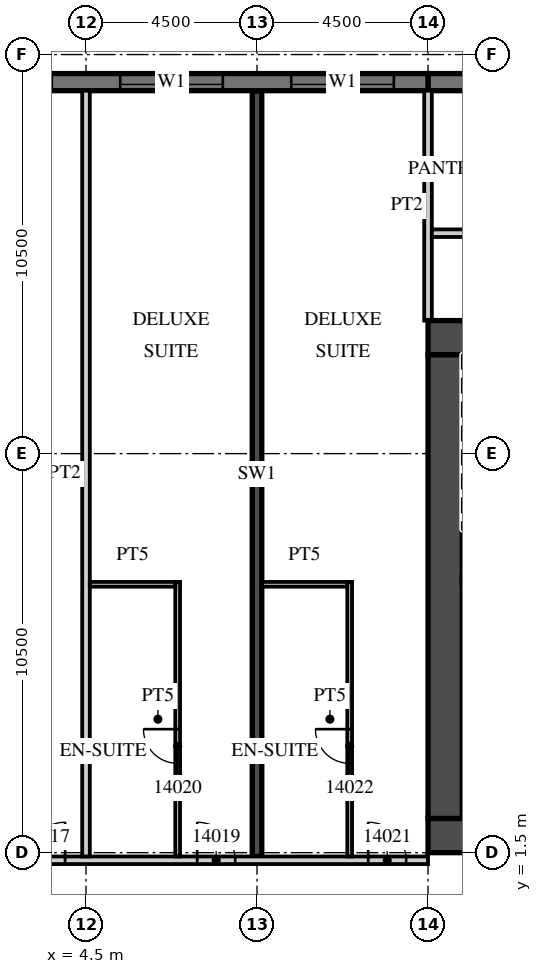
"""IFC4 building model, lengths in metres.
Left out: names, types, materials, properties, quantities, classifications, styles, units other than length and angle.
Written with IfcOpenShell. Run it as: python <this file> out.ifc"""

import sys

from ifc_helpers import new_model, si_unit, direction, frame, frame_2d, origin, place, context, subcontext, project, spatial, rectangle, extrude, element, fill, save


model = new_model("IFC4")
c1 = context("Model", 3, precision=1e-05, world=origin(), true_north=direction((0.0, 1.0)))
c2 = subcontext(c1, "Body", "Model", "MODEL_VIEW")
j1 = project(units=[si_unit("LENGTHUNIT", "METRE"), si_unit("PLANEANGLEUNIT", "RADIAN")], contexts=[c1])
p1 = place(None, origin())
s1 = spatial("IfcSite", under=j1, at=p1, CompositionType="ELEMENT")
p2 = place(p1, origin())
s2 = spatial("IfcBuilding", under=s1, at=p2, CompositionType="ELEMENT")
p3 = place(p2, frame((0.0, 0.0, 76.5)))
s3 = spatial("IfcBuildingStorey", under=s2, at=p3, CompositionType="ELEMENT", Elevation=76.5)
p4 = place(p3, frame((9.0, 1.4, 0.0), z_axis=(0.0, 0.0, 1.0), x_axis=(0.0, 1.0, 0.0)))
e1 = element("IfcWall", 1, at=p4, inside=s3, PredefinedType="SHEAR", context=c2, shape_type="SweptSolid", body=[
    extrude(rectangle(XDim=20.14, YDim=0.25, at=frame_2d((10.07, 0.0))), origin(), (0.0, 0.0, 1.0), 3.3),
])
p5 = place(p3, frame((31.5, 21.775, 0.0), z_axis=(0.0, 0.0, 1.0), x_axis=(-1.0, 0.0, 0.0)))
e2 = element("IfcWall", 2, at=p5, inside=s3, PredefinedType="SOLIDWALL", context=c2, shape_type="SweptSolid", body=[
    extrude(rectangle(XDim=18.0, YDim=0.45, at=frame_2d((9.0, 0.0))), origin(), (0.0, 0.0, 1.0), 3.02),
])
p6 = place(p3, frame((13.5, 21.775, 0.0), z_axis=(0.0, 0.0, 1.0), x_axis=(-1.0, 0.0, 0.0)))
e3 = element("IfcWall", 3, at=p6, inside=s3, PredefinedType="SOLIDWALL", context=c2, shape_type="SweptSolid", body=[
    extrude(rectangle(XDim=54.5, YDim=0.45, at=frame_2d((27.25, 0.0))), origin(), (0.0, 0.0, 1.0), 3.02),
])
p7 = place(p6, frame((0.9, 0.0, 0.45)))
e4 = element("IfcOpeningElement", 4, at=p7, cuts=e3, PredefinedType="OPENING", context=c2, shape_type="SweptSolid", body=[
    extrude(rectangle(XDim=2.7, YDim=2.25, at=frame_2d((1.35, 1.125))), frame((0.0, 0.235, 0.0), z_axis=(0.0, -1.0, 0.0), x_axis=(1.0, 0.0, 0.0)), (0.0, 0.0, 1.0), 0.47),
])
p8 = place(p6, frame((5.4, 0.0, 0.45)))
e5 = element("IfcOpeningElement", 5, at=p8, cuts=e3, PredefinedType="OPENING", context=c2, shape_type="SweptSolid", body=[
    extrude(rectangle(XDim=2.7, YDim=2.25, at=frame_2d((1.35, 1.125))), frame((0.0, 0.235, 0.0), z_axis=(0.0, -1.0, 0.0), x_axis=(1.0, 0.0, 0.0)), (0.0, 0.0, 1.0), 0.47),
])
p9 = place(p6, frame((9.9, 0.0, 0.45)))
e6 = element("IfcOpeningElement", 6, at=p9, cuts=e3, PredefinedType="OPENING", context=c2, shape_type="SweptSolid", body=[
    extrude(rectangle(XDim=2.7, YDim=2.25, at=frame_2d((1.35, 1.125))), frame((0.0, 0.235, 0.0), z_axis=(0.0, -1.0, 0.0), x_axis=(1.0, 0.0, 0.0)), (0.0, 0.0, 1.0), 0.47),
])
p10 = place(p6, frame((14.4, 0.0, 0.45)))
e7 = element("IfcOpeningElement", 7, at=p10, cuts=e3, PredefinedType="OPENING", context=c2, shape_type="SweptSolid", body=[
    extrude(rectangle(XDim=2.7, YDim=2.25, at=frame_2d((1.35, 1.125))), frame((0.0, 0.235, 0.0), z_axis=(0.0, -1.0, 0.0), x_axis=(1.0, 0.0, 0.0)), (0.0, 0.0, 1.0), 0.47),
])
p11 = place(p6, frame((18.9, 0.0, 0.45)))
e8 = element("IfcOpeningElement", 8, at=p11, cuts=e3, PredefinedType="OPENING", context=c2, shape_type="SweptSolid", body=[
    extrude(rectangle(XDim=2.7, YDim=2.25, at=frame_2d((1.35, 1.125))), frame((0.0, 0.235, 0.0), z_axis=(0.0, -1.0, 0.0), x_axis=(1.0, 0.0, 0.0)), (0.0, 0.0, 1.0), 0.47),
])
p12 = place(p6, frame((23.4, 0.0, 0.45)))
e9 = element("IfcOpeningElement", 9, at=p12, cuts=e3, PredefinedType="OPENING", context=c2, shape_type="SweptSolid", body=[
    extrude(rectangle(XDim=2.7, YDim=2.25, at=frame_2d((1.35, 1.125))), frame((0.0, 0.235, 0.0), z_axis=(0.0, -1.0, 0.0), x_axis=(1.0, 0.0, 0.0)), (0.0, 0.0, 1.0), 0.47),
])
p13 = place(p6, frame((27.9, 0.0, 0.45)))
e10 = element("IfcOpeningElement", 10, at=p13, cuts=e3, PredefinedType="OPENING", context=c2, shape_type="SweptSolid", body=[
    extrude(rectangle(XDim=2.7, YDim=2.25, at=frame_2d((1.35, 1.125))), frame((0.0, 0.235, 0.0), z_axis=(0.0, -1.0, 0.0), x_axis=(1.0, 0.0, 0.0)), (0.0, 0.0, 1.0), 0.47),
])
p14 = place(p6, frame((32.4, 0.0, 0.45)))
e11 = element("IfcOpeningElement", 11, at=p14, cuts=e3, PredefinedType="OPENING", context=c2, shape_type="SweptSolid", body=[
    extrude(rectangle(XDim=2.7, YDim=2.25, at=frame_2d((1.35, 1.125))), frame((0.0, 0.235, 0.0), z_axis=(0.0, -1.0, 0.0), x_axis=(1.0, 0.0, 0.0)), (0.0, 0.0, 1.0), 0.47),
])
p15 = place(p6, frame((36.9, 0.0, 0.45)))
e12 = element("IfcOpeningElement", 12, at=p15, cuts=e3, PredefinedType="OPENING", context=c2, shape_type="SweptSolid", body=[
    extrude(rectangle(XDim=2.7, YDim=2.25, at=frame_2d((1.35, 1.125))), frame((0.0, 0.235, 0.0), z_axis=(0.0, -1.0, 0.0), x_axis=(1.0, 0.0, 0.0)), (0.0, 0.0, 1.0), 0.47),
])
p16 = place(p6, frame((41.4, 0.0, 0.45)))
e13 = element("IfcOpeningElement", 13, at=p16, cuts=e3, PredefinedType="OPENING", context=c2, shape_type="SweptSolid", body=[
    extrude(rectangle(XDim=2.7, YDim=2.25, at=frame_2d((1.35, 1.125))), frame((0.0, 0.235, 0.0), z_axis=(0.0, -1.0, 0.0), x_axis=(1.0, 0.0, 0.0)), (0.0, 0.0, 1.0), 0.47),
])
p17 = place(p6, frame((45.9, 0.0, 0.45)))
e14 = element("IfcOpeningElement", 14, at=p17, cuts=e3, PredefinedType="OPENING", context=c2, shape_type="SweptSolid", body=[
    extrude(rectangle(XDim=2.7, YDim=2.25, at=frame_2d((1.35, 1.125))), frame((0.0, 0.235, 0.0), z_axis=(0.0, -1.0, 0.0), x_axis=(1.0, 0.0, 0.0)), (0.0, 0.0, 1.0), 0.47),
])
p18 = place(p6, frame((50.4, 0.0, 0.45)))
e15 = element("IfcOpeningElement", 15, at=p18, cuts=e3, PredefinedType="OPENING", context=c2, shape_type="SweptSolid", body=[
    extrude(rectangle(XDim=2.7, YDim=2.25, at=frame_2d((1.35, 1.125))), frame((0.0, 0.235, 0.0), z_axis=(0.0, -1.0, 0.0), x_axis=(1.0, 0.0, 0.0)), (0.0, 0.0, 1.0), 0.47),
])
p19 = place(p3, frame((13.5, 15.5, 0.0), z_axis=(0.0, 0.0, 1.0), x_axis=(0.0, 1.0, 0.0)))
e16 = element("IfcWall", 16, at=p19, inside=s3, PredefinedType="PARTITIONING", context=c2, shape_type="SweptSolid", body=[
    extrude(rectangle(XDim=6.05, YDim=0.2, at=frame_2d((3.025, 0.0))), origin(), (0.0, 0.0, 1.0), 3.02),
])
p20 = place(p3, frame((-44.55, 1.3, 0.0), z_axis=(0.0, 0.0, 1.0), x_axis=(1.0, 0.0, 0.0)))
e17 = element("IfcWall", 17, at=p20, inside=s3, PredefinedType="PARTITIONING", context=c2, shape_type="SweptSolid", body=[
    extrude(rectangle(XDim=58.05, YDim=0.2, at=frame_2d((29.025, 0.0))), origin(), (0.0, 0.0, 1.0), 3.02),
])
p21 = place(p20, frame((0.525, 0.0, 0.0)))
e18 = element("IfcOpeningElement", 18, at=p21, cuts=e17, PredefinedType="OPENING", context=c2, shape_type="SweptSolid", body=[
    extrude(rectangle(XDim=1.0, YDim=2.1, at=frame_2d((0.5, 1.05))), frame((0.0, 0.11, 0.0), z_axis=(0.0, -1.0, 0.0), x_axis=(1.0, 0.0, 0.0)), (0.0, 0.0, 1.0), 0.22),
])
p22 = place(p20, frame((6.975, 0.0, 0.0)))
e19 = element("IfcOpeningElement", 19, at=p22, cuts=e17, PredefinedType="OPENING", context=c2, shape_type="SweptSolid", body=[
    extrude(rectangle(XDim=1.0, YDim=2.1, at=frame_2d((0.5, 1.05))), frame((0.0, 0.11, 0.0), z_axis=(0.0, -1.0, 0.0), x_axis=(1.0, 0.0, 0.0)), (0.0, 0.0, 1.0), 0.22),
])
p23 = place(p20, frame((9.125, 0.0, 0.0)))
e20 = element("IfcOpeningElement", 20, at=p23, cuts=e17, PredefinedType="OPENING", context=c2, shape_type="SweptSolid", body=[
    extrude(rectangle(XDim=1.0, YDim=2.1, at=frame_2d((0.5, 1.05))), frame((0.0, 0.11, 0.0), z_axis=(0.0, -1.0, 0.0), x_axis=(1.0, 0.0, 0.0)), (0.0, 0.0, 1.0), 0.22),
])
p24 = place(p20, frame((13.6, 0.0, 0.0)))
e21 = element("IfcOpeningElement", 21, at=p24, cuts=e17, PredefinedType="OPENING", context=c2, shape_type="SweptSolid", body=[
    extrude(rectangle(XDim=1.0, YDim=2.1, at=frame_2d((0.5, 1.05))), frame((0.0, 0.11, 0.0), z_axis=(0.0, -1.0, 0.0), x_axis=(1.0, 0.0, 0.0)), (0.0, 0.0, 1.0), 0.22),
])
p25 = place(p20, frame((19.987, 0.0, 0.0)))
e22 = element("IfcOpeningElement", 22, at=p25, cuts=e17, PredefinedType="OPENING", context=c2, shape_type="SweptSolid", body=[
    extrude(rectangle(XDim=1.2, YDim=2.1, at=frame_2d((0.6, 1.05))), frame((0.0, 0.11, 0.0), z_axis=(0.0, -1.0, 0.0), x_axis=(1.0, 0.0, 0.0)), (0.0, 0.0, 1.0), 0.22),
])
p26 = place(p20, frame((31.912, 0.0, 0.0)))
e23 = element("IfcOpeningElement", 23, at=p26, cuts=e17, PredefinedType="OPENING", context=c2, shape_type="SweptSolid", body=[
    extrude(rectangle(XDim=1.2, YDim=2.1, at=frame_2d((0.6, 1.05))), frame((0.0, 0.11, 0.0), z_axis=(0.0, -1.0, 0.0), x_axis=(1.0, 0.0, 0.0)), (0.0, 0.0, 1.0), 0.22),
])
p27 = place(p20, frame((38.5, 0.0, 0.0)))
e24 = element("IfcOpeningElement", 24, at=p27, cuts=e17, PredefinedType="OPENING", context=c2, shape_type="SweptSolid", body=[
    extrude(rectangle(XDim=1.0, YDim=2.1, at=frame_2d((0.5, 1.05))), frame((0.0, 0.11, 0.0), z_axis=(0.0, -1.0, 0.0), x_axis=(1.0, 0.0, 0.0)), (0.0, 0.0, 1.0), 0.22),
])
p28 = place(p20, frame((40.6, 0.0, 0.0)))
e25 = element("IfcOpeningElement", 25, at=p28, cuts=e17, PredefinedType="OPENING", context=c2, shape_type="SweptSolid", body=[
    extrude(rectangle(XDim=1.0, YDim=2.1, at=frame_2d((0.5, 1.05))), frame((0.0, 0.11, 0.0), z_axis=(0.0, -1.0, 0.0), x_axis=(1.0, 0.0, 0.0)), (0.0, 0.0, 1.0), 0.22),
])
p29 = place(p20, frame((47.5, 0.0, 0.0)))
e26 = element("IfcOpeningElement", 26, at=p29, cuts=e17, PredefinedType="OPENING", context=c2, shape_type="SweptSolid", body=[
    extrude(rectangle(XDim=1.0, YDim=2.1, at=frame_2d((0.5, 1.05))), frame((0.0, 0.11, 0.0), z_axis=(0.0, -1.0, 0.0), x_axis=(1.0, 0.0, 0.0)), (0.0, 0.0, 1.0), 0.22),
])
p30 = place(p20, frame((51.975, 0.0, 0.0)))
e27 = element("IfcOpeningElement", 27, at=p30, cuts=e17, PredefinedType="OPENING", context=c2, shape_type="SweptSolid", body=[
    extrude(rectangle(XDim=1.0, YDim=2.1, at=frame_2d((0.5, 1.05))), frame((0.0, 0.11, 0.0), z_axis=(0.0, -1.0, 0.0), x_axis=(1.0, 0.0, 0.0)), (0.0, 0.0, 1.0), 0.22),
])
p31 = place(p20, frame((56.475, 0.0, 0.0)))
e28 = element("IfcOpeningElement", 28, at=p31, cuts=e17, PredefinedType="OPENING", context=c2, shape_type="SweptSolid", body=[
    extrude(rectangle(XDim=1.0, YDim=2.1, at=frame_2d((0.5, 1.05))), frame((0.0, 0.11, 0.0), z_axis=(0.0, -1.0, 0.0), x_axis=(1.0, 0.0, 0.0)), (0.0, 0.0, 1.0), 0.22),
])
p32 = place(p3, frame((4.5, 1.4, 0.0), z_axis=(0.0, 0.0, 1.0), x_axis=(0.0, 1.0, 0.0)))
e29 = element("IfcWall", 29, at=p32, inside=s3, PredefinedType="PARTITIONING", context=c2, shape_type="SweptSolid", body=[
    extrude(rectangle(XDim=20.15, YDim=0.2, at=frame_2d((10.075, 0.0))), origin(), (0.0, 0.0, 1.0), 3.02),
])
p33 = place(p3, frame((6.912, 1.4, 0.0), z_axis=(0.0, 0.0, 1.0), x_axis=(0.0, 1.0, 0.0)))
e30 = element("IfcWall", 30, at=p33, inside=s3, PredefinedType="PARTITIONING", context=c2, shape_type="SweptSolid", body=[
    extrude(rectangle(XDim=7.225, YDim=0.125, at=frame_2d((3.613, 0.0))), origin(), (0.0, 0.0, 1.0), 3.02),
])
p34 = place(p33, frame((2.45, 0.0, 0.0)))
e31 = element("IfcOpeningElement", 31, at=p34, cuts=e30, PredefinedType="OPENING", context=c2, shape_type="SweptSolid", body=[
    extrude(rectangle(XDim=0.9, YDim=2.1, at=frame_2d((0.45, 1.05))), frame((0.0, 0.073, 0.0), z_axis=(0.0, -1.0, 0.0), x_axis=(1.0, 0.0, 0.0)), (0.0, 0.0, 1.0), 0.145),
])
p35 = place(p3, frame((4.6, 8.562, 0.0), z_axis=(0.0, 0.0, 1.0), x_axis=(1.0, 0.0, 0.0)))
e32 = element("IfcWall", 32, at=p35, inside=s3, PredefinedType="PARTITIONING", context=c2, shape_type="SweptSolid", body=[
    extrude(rectangle(XDim=2.25, YDim=0.125, at=frame_2d((1.125, 0.0))), origin(), (0.0, 0.0, 1.0), 3.02),
])
p36 = place(p3, frame((11.438, 1.4, 0.0), z_axis=(0.0, 0.0, 1.0), x_axis=(0.0, 1.0, 0.0)))
e33 = element("IfcWall", 33, at=p36, inside=s3, PredefinedType="PARTITIONING", context=c2, shape_type="SweptSolid", body=[
    extrude(rectangle(XDim=7.225, YDim=0.125, at=frame_2d((3.613, 0.0))), origin(), (0.0, 0.0, 1.0), 3.02),
])
p37 = place(p36, frame((2.45, 0.0, 0.0)))
e34 = element("IfcOpeningElement", 34, at=p37, cuts=e33, PredefinedType="OPENING", context=c2, shape_type="SweptSolid", body=[
    extrude(rectangle(XDim=0.9, YDim=2.1, at=frame_2d((0.45, 1.05))), frame((0.0, 0.073, 0.0), z_axis=(0.0, -1.0, 0.0), x_axis=(1.0, 0.0, 0.0)), (0.0, 0.0, 1.0), 0.145),
])
p38 = place(p3, frame((9.125, 8.562, 0.0), z_axis=(0.0, 0.0, 1.0), x_axis=(1.0, 0.0, 0.0)))
e35 = element("IfcWall", 35, at=p38, inside=s3, PredefinedType="PARTITIONING", context=c2, shape_type="SweptSolid", body=[
    extrude(rectangle(XDim=2.25, YDim=0.125, at=frame_2d((1.125, 0.0))), origin(), (0.0, 0.0, 1.0), 3.02),
])
p39 = place(p3, frame((13.5, 1.95, 0.0), z_axis=(0.0, 0.0, 1.0), x_axis=(1.0, 0.0, 0.0)))
e36 = element("IfcWall", 36, at=p39, inside=s3, PredefinedType="SHEAR", context=c2, shape_type="SweptSolid", body=[
    extrude(rectangle(XDim=18.0, YDim=0.9, at=frame_2d((9.0, 0.0))), origin(), (0.0, 0.0, 1.0), 3.02),
])
p40 = place(p39, frame((1.475, 0.0, 0.0)))
e37 = element("IfcOpeningElement", 37, at=p40, cuts=e36, PredefinedType="OPENING", context=c2, shape_type="SweptSolid", body=[
    extrude(rectangle(XDim=1.8, YDim=2.1, at=frame_2d((0.9, 1.05))), frame((0.0, 0.46, 0.0), z_axis=(0.0, -1.0, 0.0), x_axis=(1.0, 0.0, 0.0)), (0.0, 0.0, 1.0), 0.92),
])
p41 = place(p3, frame((13.5, 15.05, 0.0), z_axis=(0.0, 0.0, 1.0), x_axis=(1.0, 0.0, 0.0)))
e38 = element("IfcWall", 38, at=p41, inside=s3, PredefinedType="SHEAR", context=c2, shape_type="SweptSolid", body=[
    extrude(rectangle(XDim=6.8, YDim=0.9, at=frame_2d((3.4, 0.0))), origin(), (0.0, 0.0, 1.0), 3.02),
])
p42 = place(p41, frame((4.725, 0.0, 0.0)))
e39 = element("IfcOpeningElement", 39, at=p42, cuts=e38, PredefinedType="OPENING", context=c2, shape_type="SweptSolid", body=[
    extrude(rectangle(XDim=1.2, YDim=2.1, at=frame_2d((0.6, 1.05))), frame((0.0, 0.46, 0.0), z_axis=(0.0, -1.0, 0.0), x_axis=(1.0, 0.0, 0.0)), (0.0, 0.0, 1.0), 0.92),
])
p43 = place(p3, frame((13.95, 2.4, 0.0), z_axis=(0.0, 0.0, 1.0), x_axis=(0.0, 1.0, 0.0)))
e40 = element("IfcWall", 40, at=p43, inside=s3, PredefinedType="SHEAR", context=c2, shape_type="SweptSolid", body=[
    extrude(rectangle(XDim=12.2, YDim=0.9, at=frame_2d((6.1, 0.0))), origin(), (0.0, 0.0, 1.0), 3.02),
])
p44 = place(p3, frame((13.6, 17.8, 0.0), z_axis=(0.0, 0.0, 1.0), x_axis=(1.0, 0.0, 0.0)))
e41 = element("IfcWall", 41, at=p44, inside=s3, PredefinedType="PARTITIONING", context=c2, shape_type="SweptSolid", body=[
    extrude(rectangle(XDim=30.95, YDim=0.2, at=frame_2d((15.475, 0.0))), origin(), (0.0, 0.0, 1.0), 3.02),
])
p45 = place(p44, frame((15.012, 0.0, 0.0)))
e42 = element("IfcOpeningElement", 42, at=p45, cuts=e41, PredefinedType="OPENING", context=c2, shape_type="SweptSolid", body=[
    extrude(rectangle(XDim=0.9, YDim=2.1, at=frame_2d((0.45, 1.05))), frame((0.0, 0.11, 0.0), z_axis=(0.0, -1.0, 0.0), x_axis=(1.0, 0.0, 0.0)), (0.0, 0.0, 1.0), 0.22),
])
p46 = place(p44, frame((6.712, 0.0, 0.0)))
e43 = element("IfcOpeningElement", 43, at=p46, cuts=e41, PredefinedType="OPENING", context=c2, shape_type="SweptSolid", body=[
    extrude(rectangle(XDim=0.9, YDim=2.1, at=frame_2d((0.45, 1.05))), frame((0.0, 0.11, 0.0), z_axis=(0.0, -1.0, 0.0), x_axis=(1.0, 0.0, 0.0)), (0.0, 0.0, 1.0), 0.22),
])
p47 = place(p7, origin())
e44 = element("IfcWindow", 44, at=p47, inside=s3, PartitioningType="SINGLE_PANEL", PredefinedType="WINDOW", context=c2, shape_type="SweptSolid", body=[
    extrude(rectangle(XDim=2.7, YDim=2.25, at=frame_2d((1.35, 1.125))), frame((0.0, 0.09, 0.0), z_axis=(0.0, -1.0, 0.0), x_axis=(1.0, 0.0, 0.0)), (0.0, 0.0, 1.0), 0.06),
])
fill(e4, e44)
p48 = place(p8, origin())
e45 = element("IfcWindow", 45, at=p48, inside=s3, PartitioningType="SINGLE_PANEL", PredefinedType="WINDOW", context=c2, shape_type="SweptSolid", body=[
    extrude(rectangle(XDim=2.7, YDim=2.25, at=frame_2d((1.35, 1.125))), frame((0.0, 0.09, 0.0), z_axis=(0.0, -1.0, 0.0), x_axis=(1.0, 0.0, 0.0)), (0.0, 0.0, 1.0), 0.06),
])
fill(e5, e45)
p49 = place(p29, origin())
e46 = element("IfcDoor", 46, at=p49, inside=s3, OperationType="SINGLE_SWING_RIGHT", PredefinedType="DOOR", context=c2, shape_type="SweptSolid", body=[
    extrude(rectangle(XDim=1.0, YDim=2.1, at=frame_2d((0.5, 1.05))), frame((0.0, 0.025, 0.0), z_axis=(0.0, -1.0, 0.0), x_axis=(1.0, 0.0, 0.0)), (0.0, 0.0, 1.0), 0.05),
])
fill(e26, e46)
p50 = place(p30, origin())
e47 = element("IfcDoor", 47, at=p50, inside=s3, OperationType="SINGLE_SWING_LEFT", PredefinedType="DOOR", context=c2, shape_type="SweptSolid", body=[
    extrude(rectangle(XDim=1.0, YDim=2.1, at=frame_2d((0.5, 1.05))), frame((0.0, 0.025, 0.0), z_axis=(0.0, -1.0, 0.0), x_axis=(1.0, 0.0, 0.0)), (0.0, 0.0, 1.0), 0.05),
])
fill(e27, e47)
p51 = place(p34, origin())
e48 = element("IfcDoor", 48, at=p51, inside=s3, OperationType="SINGLE_SWING_RIGHT", PredefinedType="DOOR", context=c2, shape_type="SweptSolid", body=[
    extrude(rectangle(XDim=0.9, YDim=2.1, at=frame_2d((0.45, 1.05))), frame((0.0, 0.025, 0.0), z_axis=(0.0, -1.0, 0.0), x_axis=(1.0, 0.0, 0.0)), (0.0, 0.0, 1.0), 0.05),
])
fill(e31, e48)
p52 = place(p31, origin())
e49 = element("IfcDoor", 49, at=p52, inside=s3, OperationType="SINGLE_SWING_LEFT", PredefinedType="DOOR", context=c2, shape_type="SweptSolid", body=[
    extrude(rectangle(XDim=1.0, YDim=2.1, at=frame_2d((0.5, 1.05))), frame((0.0, 0.025, 0.0), z_axis=(0.0, -1.0, 0.0), x_axis=(1.0, 0.0, 0.0)), (0.0, 0.0, 1.0), 0.05),
])
fill(e28, e49)
p53 = place(p37, origin())
e50 = element("IfcDoor", 50, at=p53, inside=s3, OperationType="SINGLE_SWING_RIGHT", PredefinedType="DOOR", context=c2, shape_type="SweptSolid", body=[
    extrude(rectangle(XDim=0.9, YDim=2.1, at=frame_2d((0.45, 1.05))), frame((0.0, 0.025, 0.0), z_axis=(0.0, -1.0, 0.0), x_axis=(1.0, 0.0, 0.0)), (0.0, 0.0, 1.0), 0.05),
])
fill(e34, e50)
save(model, sys.argv[1])
